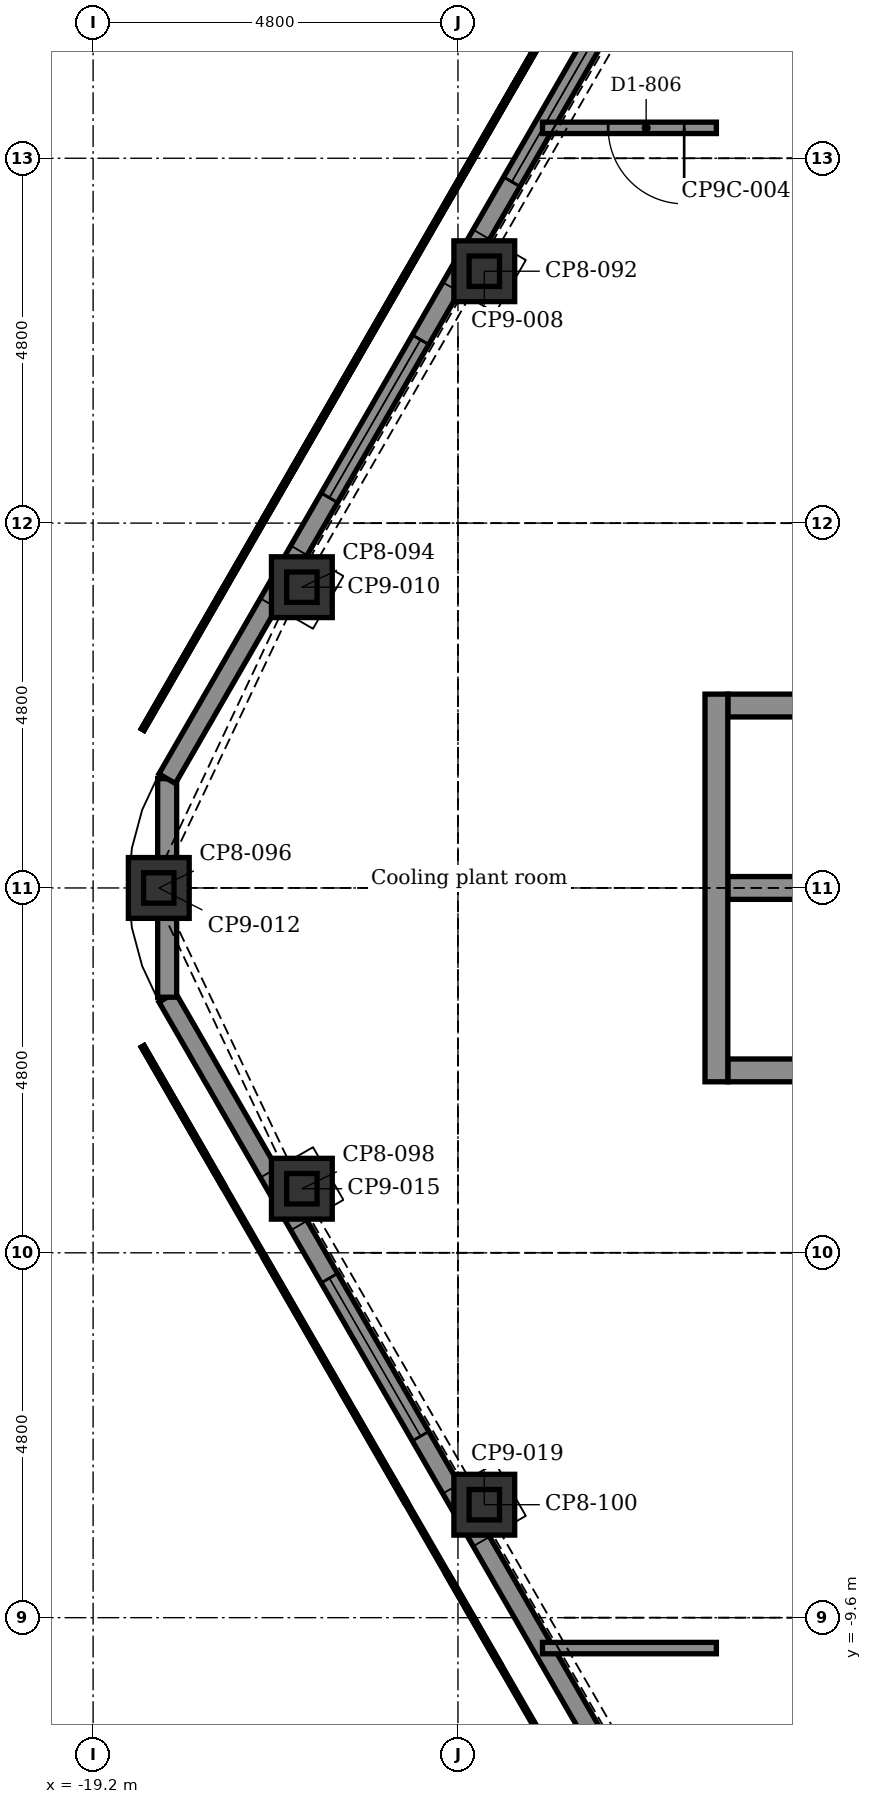
"""IFC4 building model, lengths in metres.
Left out: names, types, materials, properties, quantities, classifications, styles, units other than length and angle.
Written with IfcOpenShell. Run it as: python <this file> out.ifc"""

import sys

from ifc_helpers import new_model, si_unit, direction, frame, frame_2d, origin, origin_2d, place, context, subcontext, project, spatial, polyline, rectangle, hollow_rectangle, outline, extrude, element, fill, save


model = new_model("IFC4")
c1 = context("Model", 3, precision=1e-05, world=origin(), true_north=direction((0.0, 1.0)))
c2 = subcontext(c1, "Body", "Model", "MODEL_VIEW")
j1 = project(units=[si_unit("LENGTHUNIT", "METRE"), si_unit("PLANEANGLEUNIT", "RADIAN")], contexts=[c1])
p1 = place(None, origin())
s1 = spatial("IfcSite", under=j1, at=p1, CompositionType="ELEMENT")
p2 = place(p1, origin())
s2 = spatial("IfcBuilding", under=s1, at=p2, CompositionType="ELEMENT")
p3 = place(p2, frame((0.0, 0.0, 301.9)))
s3 = spatial("IfcBuildingStorey", under=s2, at=p3, CompositionType="ELEMENT", Elevation=301.9)
for number, where, z_axis, x_axis in (
    (1, (-14.054, -8.114, -0.3), (0.0, 0.0, 1.0), (0.866, 0.5, 0.0)),
    (2, (-16.454, -3.957, -0.3), (0.0, 0.0, 1.0), (0.866, 0.5, 0.0)),
    (3, (-18.336, 0.0, -0.3), (0.0, 0.0, 1.0), (1.0, 0.0, 0.0)),
    (4, (-16.454, 3.957, -0.3), (0.0, 0.0, 1.0), (0.5, 0.866, 0.0)),
    (5, (-14.054, 8.114, -0.3), (0.0, 0.0, 1.0), (0.5, 0.866, 0.0)),
):
    element("IfcColumn", number, at=place(p3, frame(where, z_axis=z_axis, x_axis=x_axis)), inside=s3, PredefinedType="COLUMN", context=c2, shape_type="SweptSolid", body=[
        extrude(rectangle(XDim=0.8, YDim=0.8, at=origin_2d()), origin(), (0.0, 0.0, 1.0), 5.3),
    ])
p4 = place(p3, frame((-10.85, -2.4, -0.3), z_axis=(0.0, 0.0, 1.0), x_axis=(1.0, 0.0, 0.0)))
e6 = element("IfcWall", 6, at=p4, inside=s3, PredefinedType="STANDARD", context=c2, shape_type="SweptSolid", body=[
    extrude(rectangle(XDim=1.1, YDim=0.3, at=frame_2d((0.55, 0.0))), origin(), (0.0, 0.0, 1.0), 4.7),
])
p5 = place(p3, frame((-10.85, 0.0, -0.3), z_axis=(0.0, 0.0, 1.0), x_axis=(1.0, 0.0, 0.0)))
e7 = element("IfcWall", 7, at=p5, inside=s3, PredefinedType="STANDARD", context=c2, shape_type="SweptSolid", body=[
    extrude(rectangle(XDim=3.3, YDim=0.3, at=frame_2d((1.65, 0.0))), origin(), (0.0, 0.0, 1.0), 4.7),
])
p6 = place(p3, frame((-10.85, 2.4, -0.3), z_axis=(0.0, 0.0, 1.0), x_axis=(1.0, 0.0, 0.0)))
e8 = element("IfcWall", 8, at=p6, inside=s3, PredefinedType="STANDARD", context=c2, shape_type="SweptSolid", body=[
    extrude(rectangle(XDim=1.1, YDim=0.3, at=frame_2d((0.55, 0.0))), origin(), (0.0, 0.0, 1.0), 4.7),
])
p7 = place(p3, frame((-11.0, -2.55, -0.3), z_axis=(0.0, 0.0, 1.0), x_axis=(0.0, 1.0, 0.0)))
e9 = element("IfcWall", 9, at=p7, inside=s3, PredefinedType="STANDARD", context=c2, shape_type="SweptSolid", body=[
    extrude(rectangle(XDim=5.1, YDim=0.3, at=frame_2d((2.55, 0.0))), origin(), (0.0, 0.0, 1.0), 4.7),
])
p8 = place(p3, frame((-14.054, -8.114, 5.0), z_axis=(0.0, 0.0, 1.0), x_axis=(1.0, 0.0, 0.0)))
e10 = element("IfcColumn", 10, at=p8, inside=s3, PredefinedType="COLUMN", context=c2, shape_type="SweptSolid", body=[
    extrude(hollow_rectangle(XDim=0.4, YDim=0.4, WallThickness=0.02, at=origin_2d()), origin(), (0.0, 0.0, 1.0), 4.775),
])
p9 = place(p3, frame((-16.454, -3.957, 5.0), z_axis=(0.0, 0.0, 1.0), x_axis=(1.0, 0.0, 0.0)))
e11 = element("IfcColumn", 11, at=p9, inside=s3, PredefinedType="COLUMN", context=c2, shape_type="SweptSolid", body=[
    extrude(hollow_rectangle(XDim=0.4, YDim=0.4, WallThickness=0.02, at=origin_2d()), origin(), (0.0, 0.0, 1.0), 7.373),
])
p10 = place(p3, frame((-18.336, 0.0, 5.0), z_axis=(0.0, 0.0, 1.0), x_axis=(1.0, 0.0, 0.0)))
e12 = element("IfcColumn", 12, at=p10, inside=s3, PredefinedType="COLUMN", context=c2, shape_type="SweptSolid", body=[
    extrude(hollow_rectangle(XDim=0.4, YDim=0.4, WallThickness=0.02, at=origin_2d()), origin(), (0.0, 0.0, 1.0), 9.845),
])
p11 = place(p3, frame((-16.454, 3.957, 5.0), z_axis=(0.0, 0.0, 1.0), x_axis=(1.0, 0.0, 0.0)))
e13 = element("IfcColumn", 13, at=p11, inside=s3, PredefinedType="COLUMN", context=c2, shape_type="SweptSolid", body=[
    extrude(hollow_rectangle(XDim=0.4, YDim=0.4, WallThickness=0.02, at=origin_2d()), origin(), (0.0, 0.0, 1.0), 12.318),
])
p12 = place(p3, frame((-14.054, 8.114, 5.0), z_axis=(0.0, 0.0, 1.0), x_axis=(1.0, 0.0, 0.0)))
e14 = element("IfcColumn", 14, at=p12, inside=s3, PredefinedType="COLUMN", context=c2, shape_type="SweptSolid", body=[
    extrude(hollow_rectangle(XDim=0.4, YDim=0.4, WallThickness=0.02, at=origin_2d()), origin(), (0.0, 0.0, 1.0), 14.916),
])
p13 = place(p3, frame((-10.358, -15.065, 0.0), z_axis=(0.0, 0.0, 1.0), x_axis=(-0.500010301671, 0.86601945603, 0.0)))
e15 = element("IfcWall", 15, at=p13, inside=s3, PredefinedType="SOLIDWALL", context=c2, shape_type="SweptSolid", body=[
    extrude(outline(polyline([(0.0, 0.0), (15.736, 0.0), (15.736, 14.197), (0.0, 5.682), (0.0, 0.0)])), frame((0.0, 0.125, 0.0), z_axis=(0.0, -1.0, 0.0), x_axis=(1.0, 0.0, 0.0)), (0.0, 0.0, 1.0), 0.25),
])
p14 = place(p13, frame((9.068, 0.0, 5.8)))
e16 = element("IfcOpeningElement", 16, at=p14, cuts=e15, PredefinedType="OPENING", context=c2, shape_type="SweptSolid", body=[
    extrude(rectangle(XDim=2.4, YDim=3.6, at=frame_2d((1.2, 1.8))), frame((0.0, 0.135, 0.0), z_axis=(0.0, -1.0, 0.0), x_axis=(1.0, 0.0, 0.0)), (0.0, 0.0, 1.0), 0.27),
])
p15 = place(p13, frame((9.068, 0.0, 1.0)))
e17 = element("IfcOpeningElement", 17, at=p15, cuts=e15, PredefinedType="OPENING", context=c2, shape_type="SweptSolid", body=[
    extrude(rectangle(XDim=2.4, YDim=3.0, at=frame_2d((1.2, 1.5))), frame((0.0, 0.135, 0.0), z_axis=(0.0, -1.0, 0.0), x_axis=(1.0, 0.0, 0.0)), (0.0, 0.0, 1.0), 0.27),
])
p16 = place(p3, frame((-18.226, -1.438, 0.0), z_axis=(0.0, 0.0, 1.0), x_axis=(0.0, 1.0, 0.0)))
e18 = element("IfcWall", 18, at=p16, inside=s3, PredefinedType="SOLIDWALL", context=c2, shape_type="SweptSolid", body=[
    extrude(outline(polyline([(0.0, 0.0), (2.875, 0.0), (2.875, 15.994), (0.0, 14.197), (0.0, 0.0)])), frame((0.0, 0.125, 0.0), z_axis=(0.0, -1.0, 0.0), x_axis=(1.0, 0.0, 0.0)), (0.0, 0.0, 1.0), 0.25),
])
p17 = place(p3, frame((-18.226, 1.438, 0.0), z_axis=(0.0, 0.0, 1.0), x_axis=(0.500010301671, 0.86601945603, 0.0)))
e19 = element("IfcWall", 19, at=p17, inside=s3, PredefinedType="SOLIDWALL", context=c2, shape_type="SweptSolid", body=[
    extrude(outline(polyline([(0.0, 0.0), (15.736, 0.0), (15.736, 24.509), (0.0, 15.994), (0.0, 0.0)])), frame((0.0, 0.125, 0.0), z_axis=(0.0, -1.0, 0.0), x_axis=(1.0, 0.0, 0.0)), (0.0, 0.0, 1.0), 0.25),
])
p18 = place(p17, frame((4.268, 0.0, 5.8)))
e20 = element("IfcOpeningElement", 20, at=p18, cuts=e19, PredefinedType="OPENING", context=c2, shape_type="SweptSolid", body=[
    extrude(rectangle(XDim=2.4, YDim=3.6, at=frame_2d((1.2, 1.8))), frame((0.0, 0.135, 0.0), z_axis=(0.0, -1.0, 0.0), x_axis=(1.0, 0.0, 0.0)), (0.0, 0.0, 1.0), 0.27),
])
p19 = place(p17, frame((4.268, 0.0, 10.0)))
e21 = element("IfcOpeningElement", 21, at=p19, cuts=e19, PredefinedType="OPENING", context=c2, shape_type="SweptSolid", body=[
    extrude(rectangle(XDim=2.4, YDim=3.6, at=frame_2d((1.2, 1.8))), frame((0.0, 0.135, 0.0), z_axis=(0.0, -1.0, 0.0), x_axis=(1.0, 0.0, 0.0)), (0.0, 0.0, 1.0), 0.27),
])
p20 = place(p17, frame((9.068, 0.0, 5.8)))
e22 = element("IfcOpeningElement", 22, at=p20, cuts=e19, PredefinedType="OPENING", context=c2, shape_type="SweptSolid", body=[
    extrude(rectangle(XDim=2.4, YDim=3.6, at=frame_2d((1.2, 1.8))), frame((0.0, 0.135, 0.0), z_axis=(0.0, -1.0, 0.0), x_axis=(1.0, 0.0, 0.0)), (0.0, 0.0, 1.0), 0.27),
])
p21 = place(p17, frame((9.068, 0.0, 10.0)))
e23 = element("IfcOpeningElement", 23, at=p21, cuts=e19, PredefinedType="OPENING", context=c2, shape_type="SweptSolid", body=[
    extrude(rectangle(XDim=2.4, YDim=3.6, at=frame_2d((1.2, 1.8))), frame((0.0, 0.135, 0.0), z_axis=(0.0, -1.0, 0.0), x_axis=(1.0, 0.0, 0.0)), (0.0, 0.0, 1.0), 0.27),
])
p22 = place(p17, frame((9.068, 0.0, 14.2)))
e24 = element("IfcOpeningElement", 24, at=p22, cuts=e19, PredefinedType="OPENING", context=c2, shape_type="SweptSolid", body=[
    extrude(rectangle(XDim=2.4, YDim=3.6, at=frame_2d((1.2, 1.8))), frame((0.0, 0.135, 0.0), z_axis=(0.0, -1.0, 0.0), x_axis=(1.0, 0.0, 0.0)), (0.0, 0.0, 1.0), 0.27),
])
p23 = place(p17, frame((4.268, 0.0, 1.0)))
e25 = element("IfcOpeningElement", 25, at=p23, cuts=e19, PredefinedType="OPENING", context=c2, shape_type="SweptSolid", body=[
    extrude(rectangle(XDim=2.4, YDim=3.0, at=frame_2d((1.2, 1.5))), frame((0.0, 0.135, 0.0), z_axis=(0.0, -1.0, 0.0), x_axis=(1.0, 0.0, 0.0)), (0.0, 0.0, 1.0), 0.27),
])
p24 = place(p3, frame((-13.288, -10.0, 0.0), z_axis=(0.0, 0.0, 1.0), x_axis=(1.0, 0.0, 0.0)))
e26 = element("IfcWall", 26, at=p24, inside=s3, PredefinedType="PARTITIONING", context=c2, shape_type="SweptSolid", body=[
    extrude(rectangle(XDim=2.288, YDim=0.15, at=frame_2d((1.144, 0.0))), origin(), (0.0, 0.0, 1.0), 5.0),
])
p25 = place(p3, frame((-13.288, 10.0, 0.0), z_axis=(0.0, 0.0, 1.0), x_axis=(1.0, 0.0, 0.0)))
e27 = element("IfcWall", 27, at=p25, inside=s3, PredefinedType="PARTITIONING", context=c2, shape_type="SweptSolid", body=[
    extrude(rectangle(XDim=2.288, YDim=0.15, at=frame_2d((1.144, 0.0))), origin(), (0.0, 0.0, 1.0), 5.0),
])
p26 = place(p25, frame((0.864, 0.0, 0.0)))
e28 = element("IfcOpeningElement", 28, at=p26, cuts=e27, PredefinedType="OPENING", context=c2, shape_type="SweptSolid", body=[
    extrude(rectangle(XDim=1.0, YDim=2.1, at=frame_2d((0.5, 1.05))), frame((0.0, 0.085, 0.0), z_axis=(0.0, -1.0, 0.0), x_axis=(1.0, 0.0, 0.0)), (0.0, 0.0, 1.0), 0.17),
])
p27 = place(p26, frame((1.0, 0.0, 0.0), z_axis=(0.0, 0.0, 1.0), x_axis=(-1.0, 0.0, 0.0)))
e29 = element("IfcDoor", 29, at=p27, inside=s3, OperationType="SINGLE_SWING_RIGHT", PredefinedType="DOOR", context=c2, shape_type="SweptSolid", body=[
    extrude(rectangle(XDim=1.0, YDim=2.1, at=frame_2d((0.5, 1.05))), frame((0.0, 0.025, 0.0), z_axis=(0.0, -1.0, 0.0), x_axis=(1.0, 0.0, 0.0)), (0.0, 0.0, 1.0), 0.05),
])
fill(e28, e29)
p28 = place(p14, origin())
e30 = element("IfcWindow", 30, at=p28, inside=s3, PartitioningType="SINGLE_PANEL", PredefinedType="WINDOW", context=c2, shape_type="SweptSolid", body=[
    extrude(rectangle(XDim=2.4, YDim=3.6, at=frame_2d((1.2, 1.8))), frame((0.0, 0.03, 0.0), z_axis=(0.0, -1.0, 0.0), x_axis=(1.0, 0.0, 0.0)), (0.0, 0.0, 1.0), 0.06),
])
fill(e16, e30)
p29 = place(p18, origin())
e31 = element("IfcWindow", 31, at=p29, inside=s3, PartitioningType="SINGLE_PANEL", PredefinedType="WINDOW", context=c2, shape_type="SweptSolid", body=[
    extrude(rectangle(XDim=2.4, YDim=3.6, at=frame_2d((1.2, 1.8))), frame((0.0, 0.03, 0.0), z_axis=(0.0, -1.0, 0.0), x_axis=(1.0, 0.0, 0.0)), (0.0, 0.0, 1.0), 0.06),
])
fill(e20, e31)
p30 = place(p19, origin())
e32 = element("IfcWindow", 32, at=p30, inside=s3, PartitioningType="SINGLE_PANEL", PredefinedType="WINDOW", context=c2, shape_type="SweptSolid", body=[
    extrude(rectangle(XDim=2.4, YDim=3.6, at=frame_2d((1.2, 1.8))), frame((0.0, 0.03, 0.0), z_axis=(0.0, -1.0, 0.0), x_axis=(1.0, 0.0, 0.0)), (0.0, 0.0, 1.0), 0.06),
])
fill(e21, e32)
p31 = place(p20, origin())
e33 = element("IfcWindow", 33, at=p31, inside=s3, PartitioningType="SINGLE_PANEL", PredefinedType="WINDOW", context=c2, shape_type="SweptSolid", body=[
    extrude(rectangle(XDim=2.4, YDim=3.6, at=frame_2d((1.2, 1.8))), frame((0.0, 0.03, 0.0), z_axis=(0.0, -1.0, 0.0), x_axis=(1.0, 0.0, 0.0)), (0.0, 0.0, 1.0), 0.06),
])
fill(e22, e33)
p32 = place(p21, origin())
e34 = element("IfcWindow", 34, at=p32, inside=s3, PartitioningType="SINGLE_PANEL", PredefinedType="WINDOW", context=c2, shape_type="SweptSolid", body=[
    extrude(rectangle(XDim=2.4, YDim=3.6, at=frame_2d((1.2, 1.8))), frame((0.0, 0.03, 0.0), z_axis=(0.0, -1.0, 0.0), x_axis=(1.0, 0.0, 0.0)), (0.0, 0.0, 1.0), 0.06),
])
fill(e23, e34)
p33 = place(p22, origin())
e35 = element("IfcWindow", 35, at=p33, inside=s3, PartitioningType="SINGLE_PANEL", PredefinedType="WINDOW", context=c2, shape_type="SweptSolid", body=[
    extrude(rectangle(XDim=2.4, YDim=3.6, at=frame_2d((1.2, 1.8))), frame((0.0, 0.03, 0.0), z_axis=(0.0, -1.0, 0.0), x_axis=(1.0, 0.0, 0.0)), (0.0, 0.0, 1.0), 0.06),
])
fill(e24, e35)
p34 = place(p15, origin())
e36 = element("IfcWindow", 36, at=p34, inside=s3, PartitioningType="SINGLE_PANEL", PredefinedType="WINDOW", context=c2, shape_type="SweptSolid", body=[
    extrude(rectangle(XDim=2.4, YDim=3.0, at=frame_2d((1.2, 1.5))), frame((0.0, 0.03, 0.0), z_axis=(0.0, -1.0, 0.0), x_axis=(1.0, 0.0, 0.0)), (0.0, 0.0, 1.0), 0.06),
])
fill(e17, e36)
p35 = place(p23, origin())
e37 = element("IfcWindow", 37, at=p35, inside=s3, PartitioningType="SINGLE_PANEL", PredefinedType="WINDOW", context=c2, shape_type="SweptSolid", body=[
    extrude(rectangle(XDim=2.4, YDim=3.0, at=frame_2d((1.2, 1.5))), frame((0.0, 0.03, 0.0), z_axis=(0.0, -1.0, 0.0), x_axis=(1.0, 0.0, 0.0)), (0.0, 0.0, 1.0), 0.06),
])
fill(e25, e37)
save(model, sys.argv[1])
